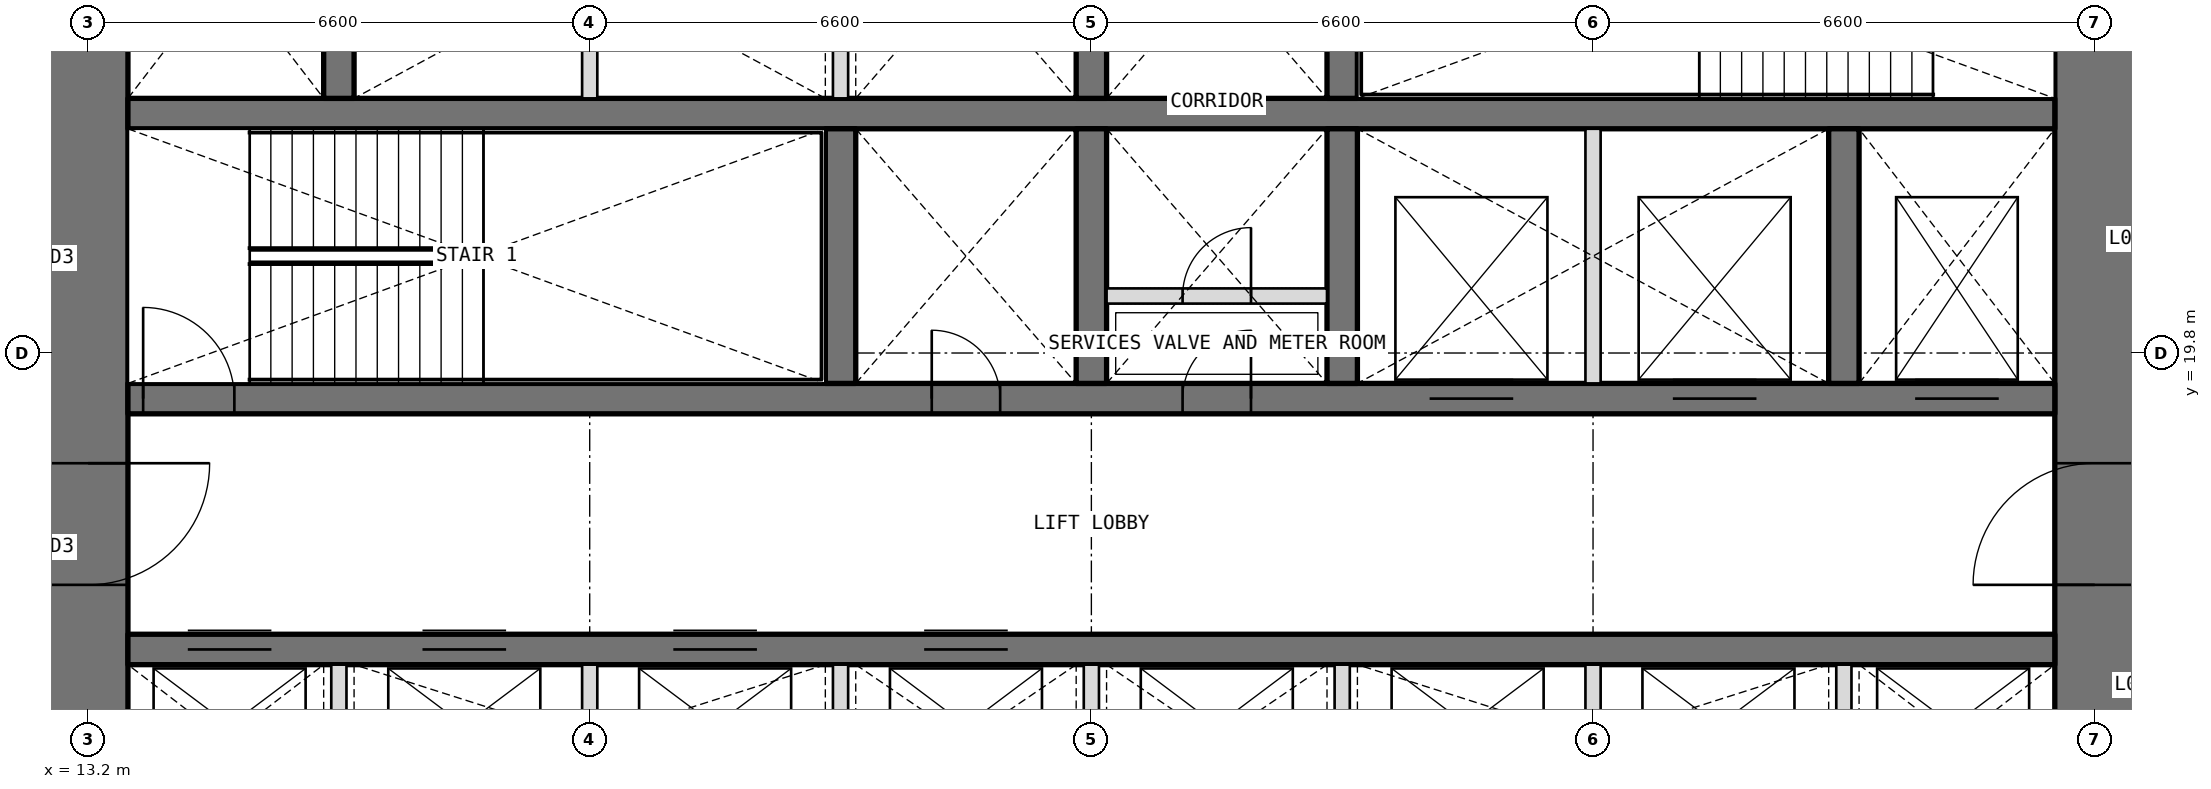
"""IFC4 building model, lengths in metres.
Left out: names, types, materials, properties, quantities, classifications, styles, units other than length and angle.
Written with IfcOpenShell. Run it as: python <this file> out.ifc"""

import sys

from ifc_helpers import new_model, si_unit, direction, frame, frame_2d, origin, place, context, subcontext, project, spatial, rectangle, extrude, element, fill, save


model = new_model("IFC4")
c1 = context("Model", 3, precision=1e-05, world=origin(), true_north=direction((0.0, 1.0)))
c2 = subcontext(c1, "Body", "Model", "MODEL_VIEW")
j1 = project(units=[si_unit("LENGTHUNIT", "METRE"), si_unit("PLANEANGLEUNIT", "RADIAN")], contexts=[c1])
p1 = place(None, origin())
s1 = spatial("IfcSite", under=j1, at=p1, CompositionType="ELEMENT")
p2 = place(p1, origin())
s2 = spatial("IfcBuilding", under=s1, at=p2, CompositionType="ELEMENT")
p3 = place(p2, frame((0.0, 0.0, 29.7)))
s3 = spatial("IfcBuildingStorey", under=s2, at=p3, CompositionType="ELEMENT", Elevation=29.7)
p4 = place(p3, frame((39.6, 13.725, 0.0), z_axis=(0.0, 0.0, 1.0), x_axis=(0.0, 1.0, 0.0)))
e1 = element("IfcWall", 1, at=p4, inside=s3, PredefinedType="SHEAR", context=c2, shape_type="SweptSolid", body=[
    extrude(rectangle(XDim=18.75, YDim=1.05, at=frame_2d((9.375, 0.0))), origin(), (0.0, 0.0, 1.0), 4.2),
])
p5 = place(p4, frame((3.025, 0.0, 0.0)))
e2 = element("IfcOpeningElement", 2, at=p5, cuts=e1, PredefinedType="OPENING", context=c2, shape_type="SweptSolid", body=[
    extrude(rectangle(XDim=1.6, YDim=2.1, at=frame_2d((0.8, 1.05))), frame((0.0, 0.535, 0.0), z_axis=(0.0, -1.0, 0.0), x_axis=(1.0, 0.0, 0.0)), (0.0, 0.0, 1.0), 1.07),
])
p6 = place(p4, frame((13.825, 0.0, 0.0)))
e3 = element("IfcOpeningElement", 3, at=p6, cuts=e1, PredefinedType="OPENING", context=c2, shape_type="SweptSolid", body=[
    extrude(rectangle(XDim=1.6, YDim=2.1, at=frame_2d((0.8, 1.05))), frame((0.0, 0.535, 0.0), z_axis=(0.0, -1.0, 0.0), x_axis=(1.0, 0.0, 0.0)), (0.0, 0.0, 1.0), 1.07),
])
p7 = place(p3, frame((13.2, 32.475, 0.0), z_axis=(0.0, 0.0, 1.0), x_axis=(0.0, -1.0, 0.0)))
e4 = element("IfcWall", 4, at=p7, inside=s3, PredefinedType="SHEAR", context=c2, shape_type="SweptSolid", body=[
    extrude(rectangle(XDim=18.75, YDim=1.05, at=frame_2d((9.375, 0.0))), origin(), (0.0, 0.0, 1.0), 4.2),
])
p8 = place(p7, frame((14.125, 0.0, 0.0)))
e5 = element("IfcOpeningElement", 5, at=p8, cuts=e4, PredefinedType="OPENING", context=c2, shape_type="SweptSolid", body=[
    extrude(rectangle(XDim=1.6, YDim=2.1, at=frame_2d((0.8, 1.05))), frame((0.0, 0.535, 0.0), z_axis=(0.0, -1.0, 0.0), x_axis=(1.0, 0.0, 0.0)), (0.0, 0.0, 1.0), 1.07),
])
p9 = place(p7, frame((3.325, 0.0, 0.0)))
e6 = element("IfcOpeningElement", 6, at=p9, cuts=e4, PredefinedType="OPENING", context=c2, shape_type="SweptSolid", body=[
    extrude(rectangle(XDim=1.6, YDim=2.1, at=frame_2d((0.8, 1.05))), frame((0.0, 0.535, 0.0), z_axis=(0.0, -1.0, 0.0), x_axis=(1.0, 0.0, 0.0)), (0.0, 0.0, 1.0), 1.07),
])
p10 = place(p3, frame((13.725, 15.9, 0.0), z_axis=(0.0, 0.0, 1.0), x_axis=(1.0, 0.0, 0.0)))
e7 = element("IfcWall", 7, at=p10, inside=s3, PredefinedType="SHEAR", context=c2, shape_type="SweptSolid", body=[
    extrude(rectangle(XDim=25.35, YDim=0.4, at=frame_2d((12.675, 0.0))), origin(), (0.0, 0.0, 1.0), 4.2),
])
p11 = place(p10, frame((0.788, 0.0, 0.0)))
e8 = element("IfcOpeningElement", 8, at=p11, cuts=e7, PredefinedType="OPENING", context=c2, shape_type="SweptSolid", body=[
    extrude(rectangle(XDim=1.1, YDim=2.1, at=frame_2d((0.55, 1.05))), frame((0.0, 0.21, 0.0), z_axis=(0.0, -1.0, 0.0), x_axis=(1.0, 0.0, 0.0)), (0.0, 0.0, 1.0), 0.42),
])
p12 = place(p10, frame((3.875, 0.0, 0.0)))
e9 = element("IfcOpeningElement", 9, at=p12, cuts=e7, PredefinedType="OPENING", context=c2, shape_type="SweptSolid", body=[
    extrude(rectangle(XDim=1.1, YDim=2.1, at=frame_2d((0.55, 1.05))), frame((0.0, 0.21, 0.0), z_axis=(0.0, -1.0, 0.0), x_axis=(1.0, 0.0, 0.0)), (0.0, 0.0, 1.0), 0.42),
])
p13 = place(p10, frame((7.175, 0.0, 0.0)))
e10 = element("IfcOpeningElement", 10, at=p13, cuts=e7, PredefinedType="OPENING", context=c2, shape_type="SweptSolid", body=[
    extrude(rectangle(XDim=1.1, YDim=2.1, at=frame_2d((0.55, 1.05))), frame((0.0, 0.21, 0.0), z_axis=(0.0, -1.0, 0.0), x_axis=(1.0, 0.0, 0.0)), (0.0, 0.0, 1.0), 0.42),
])
p14 = place(p10, frame((10.475, 0.0, 0.0)))
e11 = element("IfcOpeningElement", 11, at=p14, cuts=e7, PredefinedType="OPENING", context=c2, shape_type="SweptSolid", body=[
    extrude(rectangle(XDim=1.1, YDim=2.1, at=frame_2d((0.55, 1.05))), frame((0.0, 0.21, 0.0), z_axis=(0.0, -1.0, 0.0), x_axis=(1.0, 0.0, 0.0)), (0.0, 0.0, 1.0), 0.42),
])
p15 = place(p3, frame((13.725, 19.2, 0.0), z_axis=(0.0, 0.0, 1.0), x_axis=(1.0, 0.0, 0.0)))
e12 = element("IfcWall", 12, at=p15, inside=s3, PredefinedType="SHEAR", context=c2, shape_type="SweptSolid", body=[
    extrude(rectangle(XDim=25.35, YDim=0.4, at=frame_2d((12.675, 0.0))), origin(), (0.0, 0.0, 1.0), 4.2),
])
p16 = place(p15, frame((10.575, 0.0, 0.0)))
e13 = element("IfcOpeningElement", 13, at=p16, cuts=e12, PredefinedType="OPENING", context=c2, shape_type="SweptSolid", body=[
    extrude(rectangle(XDim=0.9, YDim=2.1, at=frame_2d((0.45, 1.05))), frame((0.0, 0.21, 0.0), z_axis=(0.0, -1.0, 0.0), x_axis=(1.0, 0.0, 0.0)), (0.0, 0.0, 1.0), 0.42),
])
p17 = place(p15, frame((13.875, 0.0, 0.0)))
e14 = element("IfcOpeningElement", 14, at=p17, cuts=e12, PredefinedType="OPENING", context=c2, shape_type="SweptSolid", body=[
    extrude(rectangle(XDim=0.9, YDim=2.1, at=frame_2d((0.45, 1.05))), frame((0.0, 0.21, 0.0), z_axis=(0.0, -1.0, 0.0), x_axis=(1.0, 0.0, 0.0)), (0.0, 0.0, 1.0), 0.42),
])
p18 = place(p15, frame((0.2, 0.0, 0.0)))
e15 = element("IfcOpeningElement", 15, at=p18, cuts=e12, PredefinedType="OPENING", context=c2, shape_type="SweptSolid", body=[
    extrude(rectangle(XDim=1.2, YDim=2.1, at=frame_2d((0.6, 1.05))), frame((0.0, 0.21, 0.0), z_axis=(0.0, -1.0, 0.0), x_axis=(1.0, 0.0, 0.0)), (0.0, 0.0, 1.0), 0.42),
])
p19 = place(p15, frame((23.512, 0.0, 0.0)))
e16 = element("IfcOpeningElement", 16, at=p19, cuts=e12, PredefinedType="OPENING", context=c2, shape_type="SweptSolid", body=[
    extrude(rectangle(XDim=1.1, YDim=2.1, at=frame_2d((0.55, 1.05))), frame((0.0, 0.21, 0.0), z_axis=(0.0, -1.0, 0.0), x_axis=(1.0, 0.0, 0.0)), (0.0, 0.0, 1.0), 0.42),
])
p20 = place(p15, frame((17.125, 0.0, 0.0)))
e17 = element("IfcOpeningElement", 17, at=p20, cuts=e12, PredefinedType="OPENING", context=c2, shape_type="SweptSolid", body=[
    extrude(rectangle(XDim=1.1, YDim=2.1, at=frame_2d((0.55, 1.05))), frame((0.0, 0.21, 0.0), z_axis=(0.0, -1.0, 0.0), x_axis=(1.0, 0.0, 0.0)), (0.0, 0.0, 1.0), 0.42),
])
p21 = place(p15, frame((20.325, 0.0, 0.0)))
e18 = element("IfcOpeningElement", 18, at=p21, cuts=e12, PredefinedType="OPENING", context=c2, shape_type="SweptSolid", body=[
    extrude(rectangle(XDim=1.1, YDim=2.1, at=frame_2d((0.55, 1.05))), frame((0.0, 0.21, 0.0), z_axis=(0.0, -1.0, 0.0), x_axis=(1.0, 0.0, 0.0)), (0.0, 0.0, 1.0), 0.42),
])
p22 = place(p3, frame((13.725, 22.95, 0.0), z_axis=(0.0, 0.0, 1.0), x_axis=(1.0, 0.0, 0.0)))
e19 = element("IfcWall", 19, at=p22, inside=s3, PredefinedType="SHEAR", context=c2, shape_type="SweptSolid", body=[
    extrude(rectangle(XDim=25.35, YDim=0.4, at=frame_2d((12.675, 0.0))), origin(), (0.0, 0.0, 1.0), 4.2),
])
for number, where, z_axis, x_axis in (
    (20, (23.1, 19.4, 0.0), (0.0, 0.0, 1.0), (0.0, 1.0, 0.0)),
    (21, (26.4, 19.4, 0.0), (0.0, 0.0, 1.0), (0.0, 1.0, 0.0)),
    (22, (29.7, 19.4, 0.0), (0.0, 0.0, 1.0), (0.0, 1.0, 0.0)),
    (23, (36.3, 19.4, 0.0), (0.0, 0.0, 1.0), (0.0, 1.0, 0.0)),
    (24, (16.5, 23.15, 0.0), (0.0, 0.0, 1.0), (0.0, 1.0, 0.0)),
    (25, (26.4, 23.15, 0.0), (0.0, 0.0, 1.0), (0.0, 1.0, 0.0)),
    (26, (29.7, 23.15, 0.0), (0.0, 0.0, 1.0), (0.0, 1.0, 0.0)),
):
    element("IfcWall", number, at=place(p3, frame(where, z_axis=z_axis, x_axis=x_axis)), inside=s3, PredefinedType="SHEAR", context=c2, shape_type="SweptSolid", body=[
        extrude(rectangle(XDim=3.35, YDim=0.4, at=frame_2d((1.675, 0.0))), origin(), (0.0, 0.0, 1.0), 4.2),
    ])
for number, where, z_axis, x_axis in (
    (27, (16.5, 13.725, 0.0), (0.0, 0.0, 1.0), (0.0, 1.0, 0.0)),
    (28, (19.8, 13.725, 0.0), (0.0, 0.0, 1.0), (0.0, 1.0, 0.0)),
    (29, (23.1, 13.725, 0.0), (0.0, 0.0, 1.0), (0.0, 1.0, 0.0)),
    (30, (26.4, 13.725, 0.0), (0.0, 0.0, 1.0), (0.0, 1.0, 0.0)),
    (31, (29.7, 13.725, 0.0), (0.0, 0.0, 1.0), (0.0, 1.0, 0.0)),
    (32, (33.0, 13.725, 0.0), (0.0, 0.0, 1.0), (0.0, 1.0, 0.0)),
    (33, (36.3, 13.725, 0.0), (0.0, 0.0, 1.0), (0.0, 1.0, 0.0)),
):
    element("IfcWall", number, at=place(p3, frame(where, z_axis=z_axis, x_axis=x_axis)), inside=s3, PredefinedType="PARTITIONING", context=c2, shape_type="SweptSolid", body=[
        extrude(rectangle(XDim=1.975, YDim=0.2, at=frame_2d((0.987, 0.0))), origin(), (0.0, 0.0, 1.0), 4.2),
    ])
for number, where, z_axis, x_axis in (
    (34, (33.0, 19.4, 0.0), (0.0, 0.0, 1.0), (0.0, 1.0, 0.0)),
    (35, (19.8, 23.15, 0.0), (0.0, 0.0, 1.0), (0.0, 1.0, 0.0)),
    (36, (23.1, 23.15, 0.0), (0.0, 0.0, 1.0), (0.0, 1.0, 0.0)),
):
    element("IfcWall", number, at=place(p3, frame(where, z_axis=z_axis, x_axis=x_axis)), inside=s3, PredefinedType="PARTITIONING", context=c2, shape_type="SweptSolid", body=[
        extrude(rectangle(XDim=3.35, YDim=0.2, at=frame_2d((1.675, 0.0))), origin(), (0.0, 0.0, 1.0), 4.2),
    ])
p23 = place(p3, frame((26.6, 20.55, 0.0), z_axis=(0.0, 0.0, 1.0), x_axis=(1.0, 0.0, 0.0)))
e37 = element("IfcWall", 37, at=p23, inside=s3, PredefinedType="PARTITIONING", context=c2, shape_type="SweptSolid", body=[
    extrude(rectangle(XDim=2.9, YDim=0.2, at=frame_2d((1.45, 0.0))), origin(), (0.0, 0.0, 1.0), 3.9),
])
p24 = place(p23, frame((1.0, 0.0, 0.0)))
e38 = element("IfcOpeningElement", 38, at=p24, cuts=e37, PredefinedType="OPENING", context=c2, shape_type="SweptSolid", body=[
    extrude(rectangle(XDim=0.9, YDim=2.1, at=frame_2d((0.45, 1.05))), frame((0.0, 0.11, 0.0), z_axis=(0.0, -1.0, 0.0), x_axis=(1.0, 0.0, 0.0)), (0.0, 0.0, 1.0), 0.22),
])
p25 = place(p16, origin())
e39 = element("IfcDoor", 39, at=p25, inside=s3, OperationType="SINGLE_SWING_LEFT", PredefinedType="DOOR", context=c2, shape_type="SweptSolid", body=[
    extrude(rectangle(XDim=0.9, YDim=2.1, at=frame_2d((0.45, 1.05))), frame((0.0, 0.025, 0.0), z_axis=(0.0, -1.0, 0.0), x_axis=(1.0, 0.0, 0.0)), (0.0, 0.0, 1.0), 0.05),
])
fill(e13, e39)
p26 = place(p17, origin())
e40 = element("IfcDoor", 40, at=p26, inside=s3, OperationType="SINGLE_SWING_RIGHT", PredefinedType="DOOR", context=c2, shape_type="SweptSolid", body=[
    extrude(rectangle(XDim=0.9, YDim=2.1, at=frame_2d((0.45, 1.05))), frame((0.0, 0.025, 0.0), z_axis=(0.0, -1.0, 0.0), x_axis=(1.0, 0.0, 0.0)), (0.0, 0.0, 1.0), 0.05),
])
fill(e14, e40)
p27 = place(p24, origin())
e41 = element("IfcDoor", 41, at=p27, inside=s3, OperationType="SINGLE_SWING_RIGHT", PredefinedType="DOOR", context=c2, shape_type="SweptSolid", body=[
    extrude(rectangle(XDim=0.9, YDim=2.1, at=frame_2d((0.45, 1.05))), frame((0.0, 0.025, 0.0), z_axis=(0.0, -1.0, 0.0), x_axis=(1.0, 0.0, 0.0)), (0.0, 0.0, 1.0), 0.05),
])
fill(e38, e41)
p28 = place(p18, origin())
e42 = element("IfcDoor", 42, at=p28, inside=s3, OperationType="SINGLE_SWING_LEFT", PredefinedType="DOOR", context=c2, shape_type="SweptSolid", body=[
    extrude(rectangle(XDim=1.2, YDim=2.1, at=frame_2d((0.6, 1.05))), frame((0.0, 0.025, 0.0), z_axis=(0.0, -1.0, 0.0), x_axis=(1.0, 0.0, 0.0)), (0.0, 0.0, 1.0), 0.05),
])
fill(e15, e42)
p29 = place(p8, origin())
e43 = element("IfcDoor", 43, at=p29, inside=s3, OperationType="DOUBLE_DOOR_DOUBLE_SWING", PredefinedType="DOOR", context=c2, shape_type="SweptSolid", body=[
    extrude(rectangle(XDim=1.6, YDim=2.1, at=frame_2d((0.8, 1.05))), frame((0.0, 0.025, 0.0), z_axis=(0.0, -1.0, 0.0), x_axis=(1.0, 0.0, 0.0)), (0.0, 0.0, 1.0), 0.05),
])
fill(e5, e43)
p30 = place(p5, origin())
e44 = element("IfcDoor", 44, at=p30, inside=s3, OperationType="DOUBLE_DOOR_DOUBLE_SWING", PredefinedType="DOOR", context=c2, shape_type="SweptSolid", body=[
    extrude(rectangle(XDim=1.6, YDim=2.1, at=frame_2d((0.8, 1.05))), frame((0.0, 0.025, 0.0), z_axis=(0.0, -1.0, 0.0), x_axis=(1.0, 0.0, 0.0)), (0.0, 0.0, 1.0), 0.05),
])
fill(e2, e44)
p31 = place(p11, origin())
e45 = element("IfcDoor", 45, at=p31, inside=s3, OperationType="DOUBLE_DOOR_SLIDING", PredefinedType="DOOR", context=c2, shape_type="SweptSolid", body=[
    extrude(rectangle(XDim=1.1, YDim=2.1, at=frame_2d((0.55, 1.05))), frame((0.0, 0.025, 0.0), z_axis=(0.0, -1.0, 0.0), x_axis=(1.0, 0.0, 0.0)), (0.0, 0.0, 1.0), 0.05),
])
fill(e8, e45)
p32 = place(p12, origin())
e46 = element("IfcDoor", 46, at=p32, inside=s3, OperationType="DOUBLE_DOOR_SLIDING", PredefinedType="DOOR", context=c2, shape_type="SweptSolid", body=[
    extrude(rectangle(XDim=1.1, YDim=2.1, at=frame_2d((0.55, 1.05))), frame((0.0, 0.025, 0.0), z_axis=(0.0, -1.0, 0.0), x_axis=(1.0, 0.0, 0.0)), (0.0, 0.0, 1.0), 0.05),
])
fill(e9, e46)
p33 = place(p13, origin())
e47 = element("IfcDoor", 47, at=p33, inside=s3, OperationType="DOUBLE_DOOR_SLIDING", PredefinedType="DOOR", context=c2, shape_type="SweptSolid", body=[
    extrude(rectangle(XDim=1.1, YDim=2.1, at=frame_2d((0.55, 1.05))), frame((0.0, 0.025, 0.0), z_axis=(0.0, -1.0, 0.0), x_axis=(1.0, 0.0, 0.0)), (0.0, 0.0, 1.0), 0.05),
])
fill(e10, e47)
p34 = place(p14, origin())
e48 = element("IfcDoor", 48, at=p34, inside=s3, OperationType="DOUBLE_DOOR_SLIDING", PredefinedType="DOOR", context=c2, shape_type="SweptSolid", body=[
    extrude(rectangle(XDim=1.1, YDim=2.1, at=frame_2d((0.55, 1.05))), frame((0.0, 0.025, 0.0), z_axis=(0.0, -1.0, 0.0), x_axis=(1.0, 0.0, 0.0)), (0.0, 0.0, 1.0), 0.05),
])
fill(e11, e48)
p35 = place(p19, origin())
e49 = element("IfcDoor", 49, at=p35, inside=s3, OperationType="DOUBLE_DOOR_SLIDING", PredefinedType="DOOR", context=c2, shape_type="SweptSolid", body=[
    extrude(rectangle(XDim=1.1, YDim=2.1, at=frame_2d((0.55, 1.05))), frame((0.0, 0.025, 0.0), z_axis=(0.0, -1.0, 0.0), x_axis=(1.0, 0.0, 0.0)), (0.0, 0.0, 1.0), 0.05),
])
fill(e16, e49)
p36 = place(p20, origin())
e50 = element("IfcDoor", 50, at=p36, inside=s3, OperationType="DOUBLE_DOOR_SLIDING", PredefinedType="DOOR", context=c2, shape_type="SweptSolid", body=[
    extrude(rectangle(XDim=1.1, YDim=2.1, at=frame_2d((0.55, 1.05))), frame((0.0, 0.025, 0.0), z_axis=(0.0, -1.0, 0.0), x_axis=(1.0, 0.0, 0.0)), (0.0, 0.0, 1.0), 0.05),
])
fill(e17, e50)
p37 = place(p21, origin())
e51 = element("IfcDoor", 51, at=p37, inside=s3, OperationType="DOUBLE_DOOR_SLIDING", PredefinedType="DOOR", context=c2, shape_type="SweptSolid", body=[
    extrude(rectangle(XDim=1.1, YDim=2.1, at=frame_2d((0.55, 1.05))), frame((0.0, 0.025, 0.0), z_axis=(0.0, -1.0, 0.0), x_axis=(1.0, 0.0, 0.0)), (0.0, 0.0, 1.0), 0.05),
])
fill(e18, e51)
save(model, sys.argv[1])
